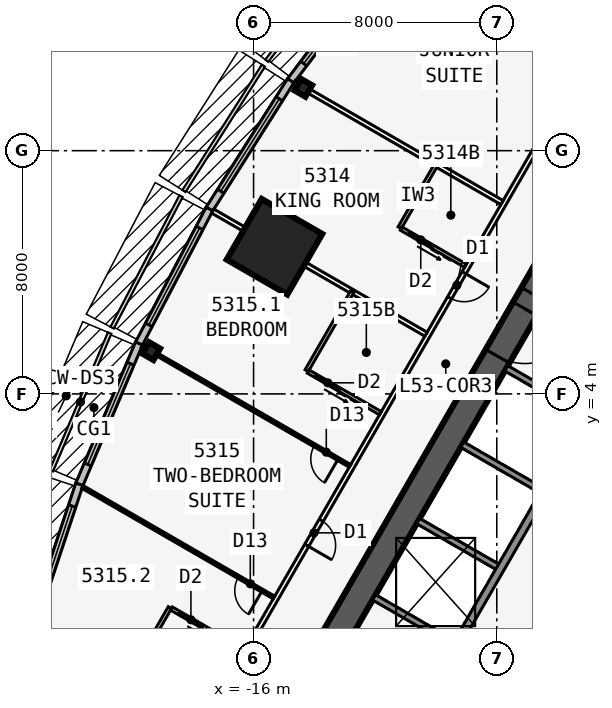
"""IFC4 building model, lengths in metres.
Left out: names, types, materials, properties, quantities, classifications, styles, units other than length and angle.
Written with IfcOpenShell. Run it as: python <this file> out.ifc"""

import sys

from ifc_helpers import new_model, si_unit, direction, frame, frame_2d, origin, origin_2d, place, context, subcontext, project, spatial, rectangle, i_section, extrude, element, fill, save


model = new_model("IFC4")
c1 = context("Model", 3, precision=1e-05, world=origin(), true_north=direction((0.0, 1.0)))
c2 = subcontext(c1, "Body", "Model", "MODEL_VIEW")
j1 = project(units=[si_unit("LENGTHUNIT", "METRE"), si_unit("PLANEANGLEUNIT", "RADIAN")], contexts=[c1])
p1 = place(None, origin())
s1 = spatial("IfcSite", under=j1, at=p1, CompositionType="ELEMENT")
p2 = place(p1, origin())
s2 = spatial("IfcBuilding", under=s1, at=p2, CompositionType="ELEMENT")
p3 = place(p2, frame((0.0, 0.0, 200.9)))
s3 = spatial("IfcBuildingStorey", under=s2, at=p3, CompositionType="ELEMENT", Elevation=200.9)
p4 = place(p3, frame((0.0, 19.052, 0.0), z_axis=(0.0, 0.0, 1.0), x_axis=(-0.499999749417, -0.866025548458, 0.0)))
e1 = element("IfcWall", 1, at=p4, inside=s3, PredefinedType="SHEAR", context=c2, shape_type="SweptSolid", body=[
    extrude(rectangle(XDim=33.0, YDim=0.9, at=frame_2d((16.5, 0.0))), origin(), (0.0, 0.0, 1.0), 3.6),
])
p5 = place(p4, frame((14.15, 0.0, 0.0)))
e2 = element("IfcOpeningElement", 2, at=p5, cuts=e1, PredefinedType="OPENING", context=c2, shape_type="SweptSolid", body=[
    extrude(rectangle(XDim=1.8, YDim=2.13, at=frame_2d((0.9, 1.065))), frame((0.0, 0.46, 0.0), z_axis=(0.0, -1.0, 0.0), x_axis=(1.0, 0.0, 0.0)), (0.0, 0.0, 1.0), 0.92),
])
p6 = place(p4, frame((12.6, 0.0, 0.0)))
e3 = element("IfcOpeningElement", 3, at=p6, cuts=e1, PredefinedType="OPENING", context=c2, shape_type="SweptSolid", body=[
    extrude(rectangle(XDim=1.0, YDim=2.13, at=frame_2d((0.5, 1.065))), frame((0.0, 0.46, 0.0), z_axis=(0.0, -1.0, 0.0), x_axis=(1.0, 0.0, 0.0)), (0.0, 0.0, 1.0), 0.92),
])
p7 = place(p3, frame((-4.929, 3.365, 0.0), z_axis=(0.0, 0.0, 1.0), x_axis=(-0.499991433582, -0.866030349552, 0.0)))
e4 = element("IfcWall", 4, at=p7, inside=s3, PredefinedType="SOLIDWALL", context=c2, shape_type="SweptSolid", body=[
    extrude(rectangle(XDim=10.633, YDim=0.25, at=frame_2d((5.316, 0.0))), origin(), (0.0, 0.0, 1.0), 3.435),
])
p8 = place(p7, frame((9.164, 0.0, 0.0)))
e5 = element("IfcOpeningElement", 5, at=p8, cuts=e4, PredefinedType="OPENING", context=c2, shape_type="SweptSolid", body=[
    extrude(rectangle(XDim=0.9, YDim=2.13, at=frame_2d((0.45, 1.065))), frame((0.0, 0.135, 0.0), z_axis=(0.0, -1.0, 0.0), x_axis=(1.0, 0.0, 0.0)), (0.0, 0.0, 1.0), 0.27),
])
for number, where, z_axis, x_axis in (
    (6, (-4.979, 3.279, 0.0), (0.0, 0.0, 1.0), (-0.866, 0.5, 0.0)),
    (7, (-6.429, 0.767, 0.0), (0.0, 0.0, 1.0), (-0.866, 0.5, 0.0)),
    (8, (-7.879, -1.744, 0.0), (0.0, 0.0, 1.0), (-0.866, 0.5, 0.0)),
    (9, (-9.329, -4.256, 0.0), (0.0, 0.0, 1.0), (-0.866, 0.5, 0.0)),
):
    element("IfcWall", number, at=place(p3, frame(where, z_axis=z_axis, x_axis=x_axis)), inside=s3, PredefinedType="SOLIDWALL", context=c2, shape_type="SweptSolid", body=[
        extrude(rectangle(XDim=3.125, YDim=0.2, at=frame_2d((1.562, 0.0))), origin(), (0.0, 0.0, 1.0), 3.435),
    ])
for number, where, z_axis, x_axis in (
    (10, (-14.363, 14.066, 0.0), (0.0, 0.0, 1.0), (-0.866, 0.5, 0.0)),
    (11, (-19.363, 5.406, 0.0), (0.0, 0.0, 1.0), (-0.866, 0.5, 0.0)),
):
    element("IfcColumn", number, at=place(p3, frame(where, z_axis=z_axis, x_axis=x_axis)), inside=s3, PredefinedType="COLUMN", context=c2, shape_type="SweptSolid", body=[
        extrude(i_section(OverallWidth=0.411, OverallDepth=0.434, WebThickness=0.036, FlangeThickness=0.057, at=origin_2d()), origin(), (0.0, 0.0, 1.0), 3.6),
    ])
p9 = place(p3, frame((-15.312, 8.84, 0.0), z_axis=(0.0, 0.0, 1.0), x_axis=(-0.866025403784, 0.5, 0.0)))
e12 = element("IfcColumn", 12, at=p9, inside=s3, PredefinedType="COLUMN", context=c2, shape_type="SweptSolid", body=[
    extrude(rectangle(XDim=2.3, YDim=2.3, at=origin_2d()), origin(), (0.0, 0.0, 1.0), 3.6),
])
p10 = place(p3, frame((-11.748, 18.312, 0.0), z_axis=(0.0, 0.0, 1.0), x_axis=(-0.602408653511, -0.798187831388, 0.0)))
e13 = element("IfcWall", 13, at=p10, inside=s3, PredefinedType="STANDARD", context=c2, shape_type="SweptSolid", body=[
    extrude(rectangle(XDim=5.038, YDim=0.25, at=frame_2d((2.519, 0.0))), origin(), (0.0, 0.0, 1.0), 3.435),
])
p11 = place(p10, frame((0.719, 0.0, 0.45)))
e14 = element("IfcOpeningElement", 14, at=p11, cuts=e13, PredefinedType="OPENING", context=c2, shape_type="SweptSolid", body=[
    extrude(rectangle(XDim=3.6, YDim=2.6, at=frame_2d((1.8, 1.3))), frame((0.0, 0.135, 0.0), z_axis=(0.0, -1.0, 0.0), x_axis=(1.0, 0.0, 0.0)), (0.0, 0.0, 1.0), 0.27),
])
p12 = place(p3, frame((-14.777, 14.299, 0.0), z_axis=(0.0, 0.0, 1.0), x_axis=(-0.535220361449, -0.844712474568, 0.0)))
e15 = element("IfcWall", 15, at=p12, inside=s3, PredefinedType="STANDARD", context=c2, shape_type="SweptSolid", body=[
    extrude(rectangle(XDim=5.004, YDim=0.25, at=frame_2d((2.502, 0.0))), origin(), (0.0, 0.0, 1.0), 3.435),
])
p13 = place(p12, frame((0.702, 0.0, 0.45)))
e16 = element("IfcOpeningElement", 16, at=p13, cuts=e15, PredefinedType="OPENING", context=c2, shape_type="SweptSolid", body=[
    extrude(rectangle(XDim=3.6, YDim=2.6, at=frame_2d((1.8, 1.3))), frame((0.0, 0.135, 0.0), z_axis=(0.0, -1.0, 0.0), x_axis=(1.0, 0.0, 0.0)), (0.0, 0.0, 1.0), 0.27),
])
p14 = place(p3, frame((-17.45, 10.081, 0.0), z_axis=(0.0, 0.0, 1.0), x_axis=(-0.463976002579, -0.885847768542, 0.0)))
e17 = element("IfcWall", 17, at=p14, inside=s3, PredefinedType="STANDARD", context=c2, shape_type="SweptSolid", body=[
    extrude(rectangle(XDim=5.004, YDim=0.25, at=frame_2d((2.502, 0.0))), origin(), (0.0, 0.0, 1.0), 3.435),
])
p15 = place(p14, frame((0.702, 0.0, 0.45)))
e18 = element("IfcOpeningElement", 18, at=p15, cuts=e17, PredefinedType="OPENING", context=c2, shape_type="SweptSolid", body=[
    extrude(rectangle(XDim=3.6, YDim=2.6, at=frame_2d((1.8, 1.3))), frame((0.0, 0.135, 0.0), z_axis=(0.0, -1.0, 0.0), x_axis=(1.0, 0.0, 0.0)), (0.0, 0.0, 1.0), 0.27),
])
p16 = place(p3, frame((-19.768, 5.657, 0.0), z_axis=(0.0, 0.0, 1.0), x_axis=(-0.390096809471, -0.920773848044, 0.0)))
e19 = element("IfcWall", 19, at=p16, inside=s3, PredefinedType="STANDARD", context=c2, shape_type="SweptSolid", body=[
    extrude(rectangle(XDim=5.038, YDim=0.25, at=frame_2d((2.519, 0.0))), origin(), (0.0, 0.0, 1.0), 3.435),
])
p17 = place(p16, frame((0.719, 0.0, 0.45)))
e20 = element("IfcOpeningElement", 20, at=p17, cuts=e19, PredefinedType="OPENING", context=c2, shape_type="SweptSolid", body=[
    extrude(rectangle(XDim=3.6, YDim=2.6, at=frame_2d((1.8, 1.3))), frame((0.0, 0.135, 0.0), z_axis=(0.0, -1.0, 0.0), x_axis=(1.0, 0.0, 0.0)), (0.0, 0.0, 1.0), 0.27),
])
p18 = place(p3, frame((-21.729, 1.028, 0.0), z_axis=(0.0, 0.0, 1.0), x_axis=(-0.315108478109, -0.949055660656, 0.0)))
e21 = element("IfcWall", 21, at=p18, inside=s3, PredefinedType="STANDARD", context=c2, shape_type="SweptSolid", body=[
    extrude(rectangle(XDim=5.105, YDim=0.25, at=frame_2d((2.552, 0.0))), origin(), (0.0, 0.0, 1.0), 3.435),
])
p19 = place(p18, frame((0.752, 0.0, 0.45)))
e22 = element("IfcOpeningElement", 22, at=p19, cuts=e21, PredefinedType="OPENING", context=c2, shape_type="SweptSolid", body=[
    extrude(rectangle(XDim=3.6, YDim=2.6, at=frame_2d((1.8, 1.3))), frame((0.0, 0.135, 0.0), z_axis=(0.0, -1.0, 0.0), x_axis=(1.0, 0.0, 0.0)), (0.0, 0.0, 1.0), 0.27),
])
p20 = place(p3, frame((-0.5, 22.836, 0.0), z_axis=(0.0, 0.0, 1.0), x_axis=(-0.500001677587, -0.866024435227, 0.0)))
e23 = element("IfcWall", 23, at=p20, inside=s3, PredefinedType="PARTITIONING", context=c2, shape_type="SweptSolid", body=[
    extrude(rectangle(XDim=39.054, YDim=0.15, at=frame_2d((19.527, 0.0))), origin(), (0.0, 0.0, 1.0), 3.435),
])
p21 = place(p20, frame((0.952, 0.0, 0.0)))
e24 = element("IfcOpeningElement", 24, at=p21, cuts=e23, PredefinedType="OPENING", context=c2, shape_type="SweptSolid", body=[
    extrude(rectangle(XDim=0.95, YDim=2.13, at=frame_2d((0.475, 1.065))), frame((0.0, 0.085, 0.0), z_axis=(0.0, -1.0, 0.0), x_axis=(1.0, 0.0, 0.0)), (0.0, 0.0, 1.0), 0.17),
])
p22 = place(p20, frame((7.752, 0.0, 0.0)))
e25 = element("IfcOpeningElement", 25, at=p22, cuts=e23, PredefinedType="OPENING", context=c2, shape_type="SweptSolid", body=[
    extrude(rectangle(XDim=0.95, YDim=2.13, at=frame_2d((0.475, 1.065))), frame((0.0, 0.085, 0.0), z_axis=(0.0, -1.0, 0.0), x_axis=(1.0, 0.0, 0.0)), (0.0, 0.0, 1.0), 0.17),
])
p23 = place(p20, frame((17.152, 0.0, 0.0)))
e26 = element("IfcOpeningElement", 26, at=p23, cuts=e23, PredefinedType="OPENING", context=c2, shape_type="SweptSolid", body=[
    extrude(rectangle(XDim=0.95, YDim=2.13, at=frame_2d((0.475, 1.065))), frame((0.0, 0.085, 0.0), z_axis=(0.0, -1.0, 0.0), x_axis=(1.0, 0.0, 0.0)), (0.0, 0.0, 1.0), 0.17),
])
p24 = place(p20, frame((26.552, 0.0, 0.0)))
e27 = element("IfcOpeningElement", 27, at=p24, cuts=e23, PredefinedType="OPENING", context=c2, shape_type="SweptSolid", body=[
    extrude(rectangle(XDim=0.95, YDim=2.13, at=frame_2d((0.475, 1.065))), frame((0.0, 0.085, 0.0), z_axis=(0.0, -1.0, 0.0), x_axis=(1.0, 0.0, 0.0)), (0.0, 0.0, 1.0), 0.17),
])
p25 = place(p20, frame((37.152, 0.0, 0.0)))
e28 = element("IfcOpeningElement", 28, at=p25, cuts=e23, PredefinedType="OPENING", context=c2, shape_type="SweptSolid", body=[
    extrude(rectangle(XDim=0.95, YDim=2.13, at=frame_2d((0.475, 1.065))), frame((0.0, 0.085, 0.0), z_axis=(0.0, -1.0, 0.0), x_axis=(1.0, 0.0, 0.0)), (0.0, 0.0, 1.0), 0.17),
])
p26 = place(p3, frame((-7.829, 10.293, 0.0), z_axis=(0.0, 0.0, 1.0), x_axis=(-0.866030558329, 0.49999107196, 0.0)))
e29 = element("IfcWall", 29, at=p26, inside=s3, PredefinedType="PARTITIONING", context=c2, shape_type="SweptSolid", body=[
    extrude(rectangle(XDim=7.894, YDim=0.15, at=frame_2d((3.947, 0.0))), origin(), (0.0, 0.0, 1.0), 2.589),
])
p27 = place(p3, frame((-10.329, 5.963, 0.0), z_axis=(0.0, 0.0, 1.0), x_axis=(-0.866016460812, 0.500015489362, 0.0)))
e30 = element("IfcWall", 30, at=p27, inside=s3, PredefinedType="PARTITIONING", context=c2, shape_type="SweptSolid", body=[
    extrude(rectangle(XDim=8.101, YDim=0.15, at=frame_2d((4.051, 0.0))), origin(), (0.0, 0.0, 1.0), 2.589),
])
p28 = place(p3, frame((-12.829, 1.633, 0.0), z_axis=(0.0, 0.0, 1.0), x_axis=(-0.866030558329, 0.49999107196, 0.0)))
e31 = element("IfcWall", 31, at=p28, inside=s3, PredefinedType="PARTITIONING", context=c2, shape_type="SweptSolid", body=[
    extrude(rectangle(XDim=7.894, YDim=0.1, at=frame_2d((3.947, 0.0))), origin(), (0.0, 0.0, 1.0), 2.589),
])
p29 = place(p28, frame((0.45, 0.0, 0.0)))
e32 = element("IfcOpeningElement", 32, at=p29, cuts=e31, PredefinedType="OPENING", context=c2, shape_type="SweptSolid", body=[
    extrude(rectangle(XDim=0.9, YDim=2.13, at=frame_2d((0.45, 1.065))), frame((0.0, 0.06, 0.0), z_axis=(0.0, -1.0, 0.0), x_axis=(1.0, 0.0, 0.0)), (0.0, 0.0, 1.0), 0.12),
])
p30 = place(p3, frame((-15.329, -2.697, 0.0), z_axis=(0.0, 0.0, 1.0), x_axis=(-0.866032413668, 0.499987858329, 0.0)))
e33 = element("IfcWall", 33, at=p30, inside=s3, PredefinedType="PARTITIONING", context=c2, shape_type="SweptSolid", body=[
    extrude(rectangle(XDim=7.273, YDim=0.1, at=frame_2d((3.636, 0.0))), origin(), (0.0, 0.0, 1.0), 2.589),
])
p31 = place(p30, frame((0.45, 0.0, 0.0)))
e34 = element("IfcOpeningElement", 34, at=p31, cuts=e33, PredefinedType="OPENING", context=c2, shape_type="SweptSolid", body=[
    extrude(rectangle(XDim=0.9, YDim=2.13, at=frame_2d((0.45, 1.065))), frame((0.0, 0.06, 0.0), z_axis=(0.0, -1.0, 0.0), x_axis=(1.0, 0.0, 0.0)), (0.0, 0.0, 1.0), 0.12),
])
p32 = place(p3, frame((-9.993, 11.543, 0.0), z_axis=(0.0, 0.0, 1.0), x_axis=(-0.500077600433, -0.865980596518, 0.0)))
e35 = element("IfcWall", 35, at=p32, inside=s3, PredefinedType="PLUMBINGWALL", context=c2, shape_type="SweptSolid", body=[
    extrude(rectangle(XDim=2.4, YDim=0.12, at=frame_2d((1.2, 0.0))), origin(), (0.0, 0.0, 1.0), 3.435),
])
p33 = place(p3, frame((-9.029, 8.215, 0.0), z_axis=(0.0, 0.0, 1.0), x_axis=(-0.866023955769, 0.500002508028, 0.0)))
e36 = element("IfcWall", 36, at=p33, inside=s3, PredefinedType="PLUMBINGWALL", context=c2, shape_type="SweptSolid", body=[
    extrude(rectangle(XDim=2.44, YDim=0.12, at=frame_2d((1.22, 0.0))), origin(), (0.0, 0.0, 1.0), 3.435),
])
p34 = place(p33, frame((1.25, 0.0, 0.0)))
e37 = element("IfcOpeningElement", 37, at=p34, cuts=e36, PredefinedType="OPENING", context=c2, shape_type="SweptSolid", body=[
    extrude(rectangle(XDim=0.9, YDim=2.13, at=frame_2d((0.45, 1.065))), frame((0.0, 0.07, 0.0), z_axis=(0.0, -1.0, 0.0), x_axis=(1.0, 0.0, 0.0)), (0.0, 0.0, 1.0), 0.14),
])
p35 = place(p3, frame((-12.753, 7.363, 0.0), z_axis=(0.0, 0.0, 1.0), x_axis=(-0.50002537861, -0.866010750942, 0.0)))
e38 = element("IfcWall", 38, at=p35, inside=s3, PredefinedType="PLUMBINGWALL", context=c2, shape_type="SweptSolid", body=[
    extrude(rectangle(XDim=3.0, YDim=0.12, at=frame_2d((1.5, 0.0))), origin(), (0.0, 0.0, 1.0), 3.435),
])
p36 = place(p3, frame((-11.829, 3.365, 0.0), z_axis=(0.0, 0.0, 1.0), x_axis=(-0.865997131366, 0.500048966069, 0.0)))
e39 = element("IfcWall", 39, at=p36, inside=s3, PredefinedType="PLUMBINGWALL", context=c2, shape_type="SweptSolid", body=[
    extrude(rectangle(XDim=2.74, YDim=0.12, at=frame_2d((1.37, 0.0))), origin(), (0.0, 0.0, 1.0), 3.435),
])
p37 = place(p36, frame((1.55, 0.0, 0.0)))
e40 = element("IfcOpeningElement", 40, at=p37, cuts=e39, PredefinedType="OPENING", context=c2, shape_type="SweptSolid", body=[
    extrude(rectangle(XDim=0.9, YDim=2.13, at=frame_2d((0.45, 1.065))), frame((0.0, 0.07, 0.0), z_axis=(0.0, -1.0, 0.0), x_axis=(1.0, 0.0, 0.0)), (0.0, 0.0, 1.0), 0.14),
])
p38 = place(p3, frame((-18.753, -3.029, 0.0), z_axis=(0.0, 0.0, 1.0), x_axis=(-0.50002537861, -0.866010750942, 0.0)))
e41 = element("IfcWall", 41, at=p38, inside=s3, PredefinedType="PLUMBINGWALL", context=c2, shape_type="SweptSolid", body=[
    extrude(rectangle(XDim=3.0, YDim=0.12, at=frame_2d((1.5, 0.0))), origin(), (0.0, 0.0, 1.0), 3.435),
])
p39 = place(p3, frame((-16.329, -4.429, 0.0), z_axis=(0.0, 0.0, 1.0), x_axis=(-0.865997131366, 0.500048966069, 0.0)))
e42 = element("IfcWall", 42, at=p39, inside=s3, PredefinedType="PLUMBINGWALL", context=c2, shape_type="SweptSolid", body=[
    extrude(rectangle(XDim=2.74, YDim=0.12, at=frame_2d((1.37, 0.0))), origin(), (0.0, 0.0, 1.0), 3.435),
])
p40 = place(p39, frame((1.55, 0.0, 0.0)))
e43 = element("IfcOpeningElement", 43, at=p40, cuts=e42, PredefinedType="OPENING", context=c2, shape_type="SweptSolid", body=[
    extrude(rectangle(XDim=0.9, YDim=2.13, at=frame_2d((0.45, 1.065))), frame((0.0, 0.07, 0.0), z_axis=(0.0, -1.0, 0.0), x_axis=(1.0, 0.0, 0.0)), (0.0, 0.0, 1.0), 0.14),
])
p41 = place(p11, origin())
e44 = element("IfcWindow", 44, at=p41, inside=s3, PartitioningType="SINGLE_PANEL", PredefinedType="WINDOW", context=c2, shape_type="SweptSolid", body=[
    extrude(rectangle(XDim=3.6, YDim=2.6, at=frame_2d((1.8, 1.3))), frame((0.0, 0.03, 0.0), z_axis=(0.0, -1.0, 0.0), x_axis=(1.0, 0.0, 0.0)), (0.0, 0.0, 1.0), 0.06),
])
fill(e14, e44)
p42 = place(p13, origin())
e45 = element("IfcWindow", 45, at=p42, inside=s3, PartitioningType="SINGLE_PANEL", PredefinedType="WINDOW", context=c2, shape_type="SweptSolid", body=[
    extrude(rectangle(XDim=3.6, YDim=2.6, at=frame_2d((1.8, 1.3))), frame((0.0, 0.03, 0.0), z_axis=(0.0, -1.0, 0.0), x_axis=(1.0, 0.0, 0.0)), (0.0, 0.0, 1.0), 0.06),
])
fill(e16, e45)
p43 = place(p15, origin())
e46 = element("IfcWindow", 46, at=p43, inside=s3, PartitioningType="SINGLE_PANEL", PredefinedType="WINDOW", context=c2, shape_type="SweptSolid", body=[
    extrude(rectangle(XDim=3.6, YDim=2.6, at=frame_2d((1.8, 1.3))), frame((0.0, 0.03, 0.0), z_axis=(0.0, -1.0, 0.0), x_axis=(1.0, 0.0, 0.0)), (0.0, 0.0, 1.0), 0.06),
])
fill(e18, e46)
p44 = place(p17, origin())
e47 = element("IfcWindow", 47, at=p44, inside=s3, PartitioningType="SINGLE_PANEL", PredefinedType="WINDOW", context=c2, shape_type="SweptSolid", body=[
    extrude(rectangle(XDim=3.6, YDim=2.6, at=frame_2d((1.8, 1.3))), frame((0.0, 0.03, 0.0), z_axis=(0.0, -1.0, 0.0), x_axis=(1.0, 0.0, 0.0)), (0.0, 0.0, 1.0), 0.06),
])
fill(e20, e47)
p45 = place(p19, origin())
e48 = element("IfcWindow", 48, at=p45, inside=s3, PartitioningType="SINGLE_PANEL", PredefinedType="WINDOW", context=c2, shape_type="SweptSolid", body=[
    extrude(rectangle(XDim=3.6, YDim=2.6, at=frame_2d((1.8, 1.3))), frame((0.0, 0.03, 0.0), z_axis=(0.0, -1.0, 0.0), x_axis=(1.0, 0.0, 0.0)), (0.0, 0.0, 1.0), 0.06),
])
fill(e22, e48)
p46 = place(p29, origin())
e49 = element("IfcDoor", 49, at=p46, inside=s3, OperationType="SINGLE_SWING_LEFT", PredefinedType="DOOR", context=c2, shape_type="SweptSolid", body=[
    extrude(rectangle(XDim=0.9, YDim=2.13, at=frame_2d((0.45, 1.065))), frame((0.0, 0.025, 0.0), z_axis=(0.0, -1.0, 0.0), x_axis=(1.0, 0.0, 0.0)), (0.0, 0.0, 1.0), 0.05),
])
fill(e32, e49)
p47 = place(p31, origin())
e50 = element("IfcDoor", 50, at=p47, inside=s3, OperationType="SINGLE_SWING_LEFT", PredefinedType="DOOR", context=c2, shape_type="SweptSolid", body=[
    extrude(rectangle(XDim=0.9, YDim=2.13, at=frame_2d((0.45, 1.065))), frame((0.0, 0.025, 0.0), z_axis=(0.0, -1.0, 0.0), x_axis=(1.0, 0.0, 0.0)), (0.0, 0.0, 1.0), 0.05),
])
fill(e34, e50)
p48 = place(p34, origin())
e51 = element("IfcDoor", 51, at=p48, inside=s3, OperationType="SLIDING_TO_LEFT", PredefinedType="DOOR", context=c2, shape_type="SweptSolid", body=[
    extrude(rectangle(XDim=0.9, YDim=2.13, at=frame_2d((0.45, 1.065))), frame((0.0, 0.025, 0.0), z_axis=(0.0, -1.0, 0.0), x_axis=(1.0, 0.0, 0.0)), (0.0, 0.0, 1.0), 0.05),
])
fill(e37, e51)
p49 = place(p23, origin())
e52 = element("IfcDoor", 52, at=p49, inside=s3, OperationType="SINGLE_SWING_LEFT", PredefinedType="DOOR", context=c2, shape_type="SweptSolid", body=[
    extrude(rectangle(XDim=0.95, YDim=2.13, at=frame_2d((0.475, 1.065))), frame((0.0, 0.025, 0.0), z_axis=(0.0, -1.0, 0.0), x_axis=(1.0, 0.0, 0.0)), (0.0, 0.0, 1.0), 0.05),
])
fill(e26, e52)
p50 = place(p37, origin())
e53 = element("IfcDoor", 53, at=p50, inside=s3, OperationType="SLIDING_TO_LEFT", PredefinedType="DOOR", context=c2, shape_type="SweptSolid", body=[
    extrude(rectangle(XDim=0.9, YDim=2.13, at=frame_2d((0.45, 1.065))), frame((0.0, 0.025, 0.0), z_axis=(0.0, -1.0, 0.0), x_axis=(1.0, 0.0, 0.0)), (0.0, 0.0, 1.0), 0.05),
])
fill(e40, e53)
p51 = place(p24, origin())
e54 = element("IfcDoor", 54, at=p51, inside=s3, OperationType="SINGLE_SWING_RIGHT", PredefinedType="DOOR", context=c2, shape_type="SweptSolid", body=[
    extrude(rectangle(XDim=0.95, YDim=2.13, at=frame_2d((0.475, 1.065))), frame((0.0, 0.025, 0.0), z_axis=(0.0, -1.0, 0.0), x_axis=(1.0, 0.0, 0.0)), (0.0, 0.0, 1.0), 0.05),
])
fill(e27, e54)
p52 = place(p40, origin())
e55 = element("IfcDoor", 55, at=p52, inside=s3, OperationType="SLIDING_TO_LEFT", PredefinedType="DOOR", context=c2, shape_type="SweptSolid", body=[
    extrude(rectangle(XDim=0.9, YDim=2.13, at=frame_2d((0.45, 1.065))), frame((0.0, 0.025, 0.0), z_axis=(0.0, -1.0, 0.0), x_axis=(1.0, 0.0, 0.0)), (0.0, 0.0, 1.0), 0.05),
])
fill(e43, e55)
p53 = place(p5, origin())
e56 = element("IfcDoor", 56, at=p53, inside=s3, OperationType="DOUBLE_DOOR_SINGLE_SWING", PredefinedType="DOOR", context=c2, shape_type="SweptSolid", body=[
    extrude(rectangle(XDim=1.8, YDim=2.13, at=frame_2d((0.9, 1.065))), frame((0.0, 0.025, 0.0), z_axis=(0.0, -1.0, 0.0), x_axis=(1.0, 0.0, 0.0)), (0.0, 0.0, 1.0), 0.05),
])
fill(e2, e56)
save(model, sys.argv[1])
